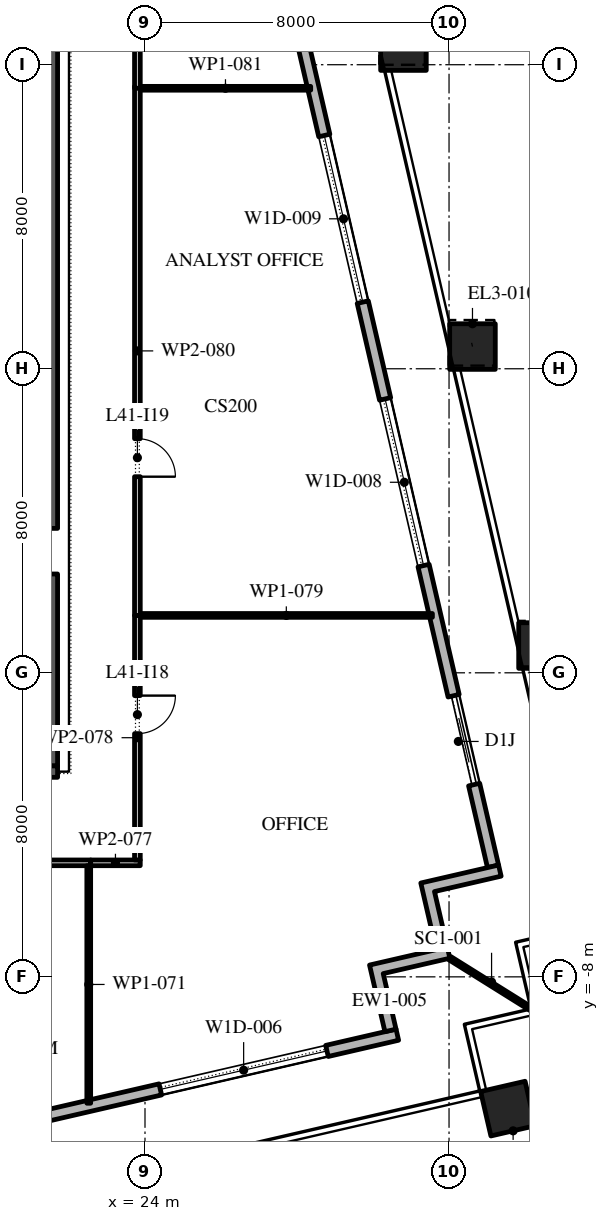
"""IFC4 building model, lengths in metres.
Left out: names, types, materials, properties, quantities, classifications, styles, units other than length and angle.
Written with IfcOpenShell. Run it as: python <this file> out.ifc"""

import sys

from ifc_helpers import new_model, si_unit, direction, frame, frame_2d, origin, origin_2d, place, context, subcontext, project, spatial, polyline, rectangle, outline, extrude, element, fill, save


model = new_model("IFC4")
c1 = context("Model", 3, precision=1e-05, world=origin(), true_north=direction((0.0, 1.0)))
c2 = subcontext(c1, "Body", "Model", "MODEL_VIEW")
j1 = project(units=[si_unit("LENGTHUNIT", "METRE"), si_unit("PLANEANGLEUNIT", "RADIAN")], contexts=[c1])
p1 = place(None, origin())
s1 = spatial("IfcSite", under=j1, at=p1, CompositionType="ELEMENT")
p2 = place(p1, origin())
s2 = spatial("IfcBuilding", under=s1, at=p2, CompositionType="ELEMENT")
p3 = place(p2, frame((0.0, 0.0, 188.4)))
s3 = spatial("IfcBuildingStorey", under=s2, at=p3, CompositionType="ELEMENT", Elevation=188.4)
p4 = place(p3, frame((33.551, -11.467, 0.0), z_axis=(0.0, 0.0, 1.0), x_axis=(0.974370064785, 0.224951054344, 0.0)))
e1 = element("IfcColumn", 1, at=p4, inside=s3, PredefinedType="COLUMN", context=c2, shape_type="SweptSolid", body=[
    extrude(rectangle(XDim=1.2, YDim=1.2, at=origin_2d()), origin(), (0.0, 0.0, 1.0), 4.2),
])
p5 = place(p3, frame((34.433, 0.718, 0.0), z_axis=(-0.002731726181, 0.011682488562, 0.999928025976), x_axis=(-0.973733900744, -0.227689021567, 0.0)))
e2 = element("IfcColumn", 2, at=p5, inside=s3, PredefinedType="COLUMN", context=c2, shape_type="SweptSolid", body=[
    extrude(rectangle(XDim=1.2, YDim=1.2, at=origin_2d()), origin(), (0.0, 0.0, 1.0), 4.2),
])
p6 = place(p3, frame((32.617, 8.584, 0.0), z_axis=(-0.00540415818, 0.023418018779, 0.999711154019), x_axis=(-0.974391195695, -0.224859506699, 0.0)))
e3 = element("IfcColumn", 3, at=p6, inside=s3, PredefinedType="COLUMN", context=c2, shape_type="SweptSolid", body=[
    extrude(rectangle(XDim=1.2, YDim=1.2, at=origin_2d()), origin(), (0.0, 0.0, 1.0), 4.201),
])
p7 = place(p3, frame((30.801, 16.451, 0.0), z_axis=(-0.008074278456, 0.035085353866, 0.999351701841), x_axis=(-0.974526982896, -0.224270282488, 0.0)))
e4 = element("IfcColumn", 4, at=p7, inside=s3, PredefinedType="COLUMN", context=c2, shape_type="SweptSolid", body=[
    extrude(rectangle(XDim=1.2, YDim=1.2, at=origin_2d()), origin(), (0.0, 0.0, 1.0), 4.203),
])
p8 = place(p3, frame((-17.592, -20.657, 0.0), z_axis=(0.0, 0.0, 1.0), x_axis=(0.974370243697, 0.224950279389, 0.0)))
e5 = element("IfcWall", 5, at=p8, inside=s3, PredefinedType="STANDARD", context=c2, shape_type="SweptSolid", body=[
    extrude(rectangle(XDim=49.5, YDim=0.3, at=frame_2d((24.75, 0.0))), origin(), (0.0, 0.0, 1.0), 4.0),
])
p9 = place(p8, frame((2.8, 0.0, 0.0)))
e6 = element("IfcOpeningElement", 6, at=p9, cuts=e5, PredefinedType="OPENING", context=c2, shape_type="SweptSolid", body=[
    extrude(rectangle(XDim=2.4, YDim=3.5, at=frame_2d((1.2, 1.75))), frame((0.0, 0.16, 0.0), z_axis=(0.0, -1.0, 0.0), x_axis=(1.0, 0.0, 0.0)), (0.0, 0.0, 1.0), 0.32),
])
p10 = place(p8, frame((9.9, 0.0, 0.45)))
e7 = element("IfcOpeningElement", 7, at=p10, cuts=e5, PredefinedType="OPENING", context=c2, shape_type="SweptSolid", body=[
    extrude(rectangle(XDim=4.5, YDim=2.575, at=frame_2d((2.25, 1.288))), frame((0.0, 0.16, 0.0), z_axis=(0.0, -1.0, 0.0), x_axis=(1.0, 0.0, 0.0)), (0.0, 0.0, 1.0), 0.32),
])
p11 = place(p8, frame((18.2, 0.0, 0.45)))
e8 = element("IfcOpeningElement", 8, at=p11, cuts=e5, PredefinedType="OPENING", context=c2, shape_type="SweptSolid", body=[
    extrude(rectangle(XDim=4.5, YDim=3.05, at=frame_2d((2.25, 1.525))), frame((0.0, 0.16, 0.0), z_axis=(0.0, -1.0, 0.0), x_axis=(1.0, 0.0, 0.0)), (0.0, 0.0, 1.0), 0.32),
])
p12 = place(p8, frame((26.5, 0.0, 0.45)))
e9 = element("IfcOpeningElement", 9, at=p12, cuts=e5, PredefinedType="OPENING", context=c2, shape_type="SweptSolid", body=[
    extrude(rectangle(XDim=4.5, YDim=2.75, at=frame_2d((2.25, 1.375))), frame((0.0, 0.16, 0.0), z_axis=(0.0, -1.0, 0.0), x_axis=(1.0, 0.0, 0.0)), (0.0, 0.0, 1.0), 0.32),
])
p13 = place(p8, frame((35.85, 0.0, 0.0)))
e10 = element("IfcOpeningElement", 10, at=p13, cuts=e5, PredefinedType="OPENING", context=c2, shape_type="SweptSolid", body=[
    extrude(rectangle(XDim=2.4, YDim=3.5, at=frame_2d((1.2, 1.75))), frame((0.0, 0.16, 0.0), z_axis=(0.0, -1.0, 0.0), x_axis=(1.0, 0.0, 0.0)), (0.0, 0.0, 1.0), 0.32),
])
p14 = place(p8, frame((43.1, 0.0, 0.45)))
e11 = element("IfcOpeningElement", 11, at=p14, cuts=e5, PredefinedType="OPENING", context=c2, shape_type="SweptSolid", body=[
    extrude(rectangle(XDim=4.5, YDim=2.875, at=frame_2d((2.25, 1.438))), frame((0.0, 0.16, 0.0), z_axis=(0.0, -1.0, 0.0), x_axis=(1.0, 0.0, 0.0)), (0.0, 0.0, 1.0), 0.32),
])
p15 = place(p3, frame((33.157, -5.092, 0.0), z_axis=(0.0, 0.0, 1.0), x_axis=(-0.224950279389, 0.974370243697, 0.0)))
e12 = element("IfcWall", 12, at=p15, inside=s3, PredefinedType="STANDARD", context=c2, shape_type="SweptSolid", body=[
    extrude(rectangle(XDim=49.5, YDim=0.3, at=frame_2d((24.75, 0.0))), origin(), (0.0, 0.0, 1.0), 4.0),
])
p16 = place(p15, frame((2.207, 0.0, 0.0)))
e13 = element("IfcOpeningElement", 13, at=p16, cuts=e12, PredefinedType="OPENING", context=c2, shape_type="SweptSolid", body=[
    extrude(rectangle(XDim=2.4, YDim=3.125, at=frame_2d((1.2, 1.562))), frame((0.0, 0.16, 0.0), z_axis=(0.0, -1.0, 0.0), x_axis=(1.0, 0.0, 0.0)), (0.0, 0.0, 1.0), 0.32),
])
p17 = place(p15, frame((8.121, 0.0, 0.45)))
e14 = element("IfcOpeningElement", 14, at=p17, cuts=e12, PredefinedType="OPENING", context=c2, shape_type="SweptSolid", body=[
    extrude(rectangle(XDim=4.5, YDim=2.875, at=frame_2d((2.25, 1.438))), frame((0.0, 0.16, 0.0), z_axis=(0.0, -1.0, 0.0), x_axis=(1.0, 0.0, 0.0)), (0.0, 0.0, 1.0), 0.32),
])
p18 = place(p15, frame((15.236, 0.0, 0.45)))
e15 = element("IfcOpeningElement", 15, at=p18, cuts=e12, PredefinedType="OPENING", context=c2, shape_type="SweptSolid", body=[
    extrude(rectangle(XDim=4.5, YDim=2.875, at=frame_2d((2.25, 1.438))), frame((0.0, 0.16, 0.0), z_axis=(0.0, -1.0, 0.0), x_axis=(1.0, 0.0, 0.0)), (0.0, 0.0, 1.0), 0.32),
])
p19 = place(p15, frame((22.35, 0.0, 0.45)))
e16 = element("IfcOpeningElement", 16, at=p19, cuts=e12, PredefinedType="OPENING", context=c2, shape_type="SweptSolid", body=[
    extrude(rectangle(XDim=4.5, YDim=3.0, at=frame_2d((2.25, 1.5))), frame((0.0, 0.16, 0.0), z_axis=(0.0, -1.0, 0.0), x_axis=(1.0, 0.0, 0.0)), (0.0, 0.0, 1.0), 0.32),
])
p20 = place(p15, frame((30.514, 0.0, 0.0)))
e17 = element("IfcOpeningElement", 17, at=p20, cuts=e12, PredefinedType="OPENING", context=c2, shape_type="SweptSolid", body=[
    extrude(rectangle(XDim=2.4, YDim=3.45, at=frame_2d((1.2, 1.725))), frame((0.0, 0.16, 0.0), z_axis=(0.0, -1.0, 0.0), x_axis=(1.0, 0.0, 0.0)), (0.0, 0.0, 1.0), 0.32),
])
p21 = place(p15, frame((36.579, 0.0, 0.45)))
e18 = element("IfcOpeningElement", 18, at=p21, cuts=e12, PredefinedType="OPENING", context=c2, shape_type="SweptSolid", body=[
    extrude(rectangle(XDim=4.5, YDim=3.05, at=frame_2d((2.25, 1.525))), frame((0.0, 0.16, 0.0), z_axis=(0.0, -1.0, 0.0), x_axis=(1.0, 0.0, 0.0)), (0.0, 0.0, 1.0), 0.32),
])
p22 = place(p15, frame((43.693, 0.0, 0.45)))
e19 = element("IfcOpeningElement", 19, at=p22, cuts=e12, PredefinedType="OPENING", context=c2, shape_type="SweptSolid", body=[
    extrude(rectangle(XDim=4.5, YDim=3.05, at=frame_2d((2.25, 1.525))), frame((0.0, 0.16, 0.0), z_axis=(0.0, -1.0, 0.0), x_axis=(1.0, 0.0, 0.0)), (0.0, 0.0, 1.0), 0.32),
])
p23 = place(p3, origin())
e20 = element("IfcWall", 20, at=p23, inside=s3, PredefinedType="STANDARD", context=c2, shape_type="SweptSolid", body=[
    extrude(outline(polyline([(31.662, -7.285), (31.257, -5.531), (33.303, -5.058), (33.371, -5.351), (31.617, -5.756), (32.022, -7.51), (30.268, -7.914), (30.605, -9.376), (30.313, -9.443), (29.908, -7.69), (31.662, -7.285)])), origin(), (0.0, 0.0, 1.0), 4.0),
])
p24 = place(p3, frame((32.022, -7.51, -0.05), z_axis=(0.0, 0.0, 1.0), x_axis=(0.848047176257, -0.529920736377, 0.0)))
e21 = element("IfcWall", 21, at=p24, inside=s3, PredefinedType="STANDARD", context=c2, shape_type="SweptSolid", body=[
    extrude(rectangle(XDim=2.526, YDim=0.1, at=frame_2d((1.263, 0.0))), origin(), (0.0, 0.0, 1.0), 4.05),
])
p25 = place(p3, frame((21.35, -2.45, 0.0), z_axis=(0.0, 0.0, 1.0), x_axis=(0.0, 1.0, 0.0)))
e22 = element("IfcWall", 22, at=p25, inside=s3, PredefinedType="SHEAR", context=c2, shape_type="SweptSolid", body=[
    extrude(rectangle(XDim=27.9, YDim=0.7, at=frame_2d((13.95, 0.0))), origin(), (0.0, 0.0, 1.0), 4.0),
])
p26 = place(p25, frame((5.05, 0.0, 0.0)))
e23 = element("IfcOpeningElement", 23, at=p26, cuts=e22, PredefinedType="OPENING", context=c2, shape_type="SweptSolid", body=[
    extrude(rectangle(XDim=1.2, YDim=2.1, at=frame_2d((0.6, 1.05))), frame((0.0, 0.36, 0.0), z_axis=(0.0, -1.0, 0.0), x_axis=(1.0, 0.0, 0.0)), (0.0, 0.0, 1.0), 0.72),
])
p27 = place(p25, frame((21.65, 0.0, 0.0)))
e24 = element("IfcOpeningElement", 24, at=p27, cuts=e22, PredefinedType="OPENING", context=c2, shape_type="SweptSolid", body=[
    extrude(rectangle(XDim=1.2, YDim=2.1, at=frame_2d((0.6, 1.05))), frame((0.0, 0.36, 0.0), z_axis=(0.0, -1.0, 0.0), x_axis=(1.0, 0.0, 0.0)), (0.0, 0.0, 1.0), 0.72),
])
p28 = place(p3, frame((10.3, -2.6, 0.0), z_axis=(0.0, 0.0, 1.0), x_axis=(1.0, 0.0, 0.0)))
e25 = element("IfcWall", 25, at=p28, inside=s3, PredefinedType="SHEAR", context=c2, shape_type="SweptSolid", body=[
    extrude(rectangle(XDim=11.4, YDim=0.3, at=frame_2d((5.7, 0.0))), origin(), (0.0, 0.0, 1.0), 4.0),
])
p29 = place(p3, frame((22.57, -5.0, 0.0), z_axis=(0.0, 0.0, 1.0), x_axis=(-1.0, 0.0, 0.0)))
e26 = element("IfcWall", 26, at=p29, inside=s3, PredefinedType="PARTITIONING", context=c2, shape_type="SweptSolid", body=[
    extrude(rectangle(XDim=8.14, YDim=0.15, at=frame_2d((4.07, 0.0))), origin(), (0.0, 0.0, 1.0), 4.0),
])
p30 = place(p29, frame((3.49, 0.0, 0.0)))
e27 = element("IfcOpeningElement", 27, at=p30, cuts=e26, PredefinedType="OPENING", context=c2, shape_type="SweptSolid", body=[
    extrude(rectangle(XDim=1.0, YDim=2.1, at=frame_2d((0.5, 1.05))), frame((0.0, 0.085, 0.0), z_axis=(0.0, -1.0, 0.0), x_axis=(1.0, 0.0, 0.0)), (0.0, 0.0, 1.0), 0.17),
])
p31 = place(p3, frame((22.52, -5.075, 0.0), z_axis=(0.0, 0.0, 1.0), x_axis=(0.0, -1.0, 0.0)))
e28 = element("IfcWall", 28, at=p31, inside=s3, PredefinedType="PARTITIONING", context=c2, shape_type="SweptSolid", body=[
    extrude(rectangle(XDim=6.25, YDim=0.1, at=frame_2d((3.125, 0.0))), origin(), (0.0, 0.0, 1.0), 4.0),
])
p32 = place(p3, frame((23.875, -5.0, 0.0), z_axis=(0.0, 0.0, 1.0), x_axis=(-1.0, 0.0, 0.0)))
e29 = element("IfcWall", 29, at=p32, inside=s3, PredefinedType="PARTITIONING", context=c2, shape_type="SweptSolid", body=[
    extrude(rectangle(XDim=1.305, YDim=0.15, at=frame_2d((0.652, 0.0))), origin(), (0.0, 0.0, 1.0), 4.0),
])
p33 = place(p3, frame((23.8, 1.51, 0.0), z_axis=(0.0, 0.0, 1.0), x_axis=(0.0, -1.0, 0.0)))
e30 = element("IfcWall", 30, at=p33, inside=s3, PredefinedType="PARTITIONING", context=c2, shape_type="SweptSolid", body=[
    extrude(rectangle(XDim=6.435, YDim=0.15, at=frame_2d((3.218, 0.0))), origin(), (0.0, 0.0, 1.0), 4.0),
])
p34 = place(p33, frame((2.11, 0.0, 0.0)))
e31 = element("IfcOpeningElement", 31, at=p34, cuts=e30, PredefinedType="OPENING", context=c2, shape_type="SweptSolid", body=[
    extrude(rectangle(XDim=1.0, YDim=2.1, at=frame_2d((0.5, 1.05))), frame((0.0, 0.085, 0.0), z_axis=(0.0, -1.0, 0.0), x_axis=(1.0, 0.0, 0.0)), (0.0, 0.0, 1.0), 0.17),
])
p35 = place(p3, frame((23.875, 1.51, 0.0), z_axis=(0.0, 0.0, 1.0), x_axis=(1.0, 0.0, 0.0)))
e32 = element("IfcWall", 32, at=p35, inside=s3, PredefinedType="PARTITIONING", context=c2, shape_type="SweptSolid", body=[
    extrude(rectangle(XDim=7.687, YDim=0.1, at=frame_2d((3.844, 0.0))), origin(), (0.0, 0.0, 1.0), 4.0),
])
p36 = place(p3, frame((23.8, 15.43, 0.0), z_axis=(0.0, 0.0, 1.0), x_axis=(0.0, -1.0, 0.0)))
e33 = element("IfcWall", 33, at=p36, inside=s3, PredefinedType="PARTITIONING", context=c2, shape_type="SweptSolid", body=[
    extrude(rectangle(XDim=13.92, YDim=0.15, at=frame_2d((6.96, 0.0))), origin(), (0.0, 0.0, 1.0), 4.0),
])
p37 = place(p36, frame((9.27, 0.0, 0.0)))
e34 = element("IfcOpeningElement", 34, at=p37, cuts=e33, PredefinedType="OPENING", context=c2, shape_type="SweptSolid", body=[
    extrude(rectangle(XDim=1.0, YDim=2.1, at=frame_2d((0.5, 1.05))), frame((0.0, 0.085, 0.0), z_axis=(0.0, -1.0, 0.0), x_axis=(1.0, 0.0, 0.0)), (0.0, 0.0, 1.0), 0.17),
])
p38 = place(p3, frame((23.875, 15.38, 0.0), z_axis=(0.0, 0.0, 1.0), x_axis=(1.0, 0.0, 0.0)))
e35 = element("IfcWall", 35, at=p38, inside=s3, PredefinedType="PARTITIONING", context=c2, shape_type="SweptSolid", body=[
    extrude(rectangle(XDim=4.485, YDim=0.1, at=frame_2d((2.243, 0.0))), origin(), (0.0, 0.0, 1.0), 4.0),
])
p39 = place(p3, frame((23.8, 23.54, 0.0), z_axis=(0.0, 0.0, 1.0), x_axis=(0.0, -1.0, 0.0)))
e36 = element("IfcWall", 36, at=p39, inside=s3, PredefinedType="PARTITIONING", context=c2, shape_type="SweptSolid", body=[
    extrude(rectangle(XDim=8.16, YDim=0.15, at=frame_2d((4.08, 0.0))), origin(), (0.0, 0.0, 1.0), 4.0),
])
p40 = place(p39, frame((3.51, 0.0, 0.0)))
e37 = element("IfcOpeningElement", 37, at=p40, cuts=e36, PredefinedType="OPENING", context=c2, shape_type="SweptSolid", body=[
    extrude(rectangle(XDim=1.0, YDim=2.1, at=frame_2d((0.5, 1.05))), frame((0.0, 0.085, 0.0), z_axis=(0.0, -1.0, 0.0), x_axis=(1.0, 0.0, 0.0)), (0.0, 0.0, 1.0), 0.17),
])
p41 = place(p14, origin())
e38 = element("IfcWindow", 38, at=p41, inside=s3, PartitioningType="DOUBLE_PANEL_VERTICAL", PredefinedType="WINDOW", context=c2, shape_type="SweptSolid", body=[
    extrude(rectangle(XDim=4.5, YDim=2.875, at=frame_2d((2.25, 1.438))), frame((0.0, 0.03, 0.0), z_axis=(0.0, -1.0, 0.0), x_axis=(1.0, 0.0, 0.0)), (0.0, 0.0, 1.0), 0.06),
])
fill(e11, e38)
p42 = place(p16, origin())
e39 = element("IfcDoor", 39, at=p42, inside=s3, OperationType="DOUBLE_DOOR_SLIDING", PredefinedType="DOOR", context=c2, shape_type="SweptSolid", body=[
    extrude(rectangle(XDim=2.4, YDim=3.125, at=frame_2d((1.2, 1.562))), frame((0.0, 0.025, 0.0), z_axis=(0.0, -1.0, 0.0), x_axis=(1.0, 0.0, 0.0)), (0.0, 0.0, 1.0), 0.05),
])
fill(e13, e39)
p43 = place(p17, origin())
e40 = element("IfcWindow", 40, at=p43, inside=s3, PartitioningType="DOUBLE_PANEL_VERTICAL", PredefinedType="WINDOW", context=c2, shape_type="SweptSolid", body=[
    extrude(rectangle(XDim=4.5, YDim=2.875, at=frame_2d((2.25, 1.438))), frame((0.0, 0.03, 0.0), z_axis=(0.0, -1.0, 0.0), x_axis=(1.0, 0.0, 0.0)), (0.0, 0.0, 1.0), 0.06),
])
fill(e14, e40)
p44 = place(p18, origin())
e41 = element("IfcWindow", 41, at=p44, inside=s3, PartitioningType="DOUBLE_PANEL_VERTICAL", PredefinedType="WINDOW", context=c2, shape_type="SweptSolid", body=[
    extrude(rectangle(XDim=4.5, YDim=2.875, at=frame_2d((2.25, 1.438))), frame((0.0, 0.03, 0.0), z_axis=(0.0, -1.0, 0.0), x_axis=(1.0, 0.0, 0.0)), (0.0, 0.0, 1.0), 0.06),
])
fill(e15, e41)
p45 = place(p34, origin())
e42 = element("IfcDoor", 42, at=p45, inside=s3, OperationType="SINGLE_SWING_RIGHT", PredefinedType="DOOR", context=c2, shape_type="SweptSolid", body=[
    extrude(rectangle(XDim=1.0, YDim=2.1, at=frame_2d((0.5, 1.05))), frame((0.0, 0.025, 0.0), z_axis=(0.0, -1.0, 0.0), x_axis=(1.0, 0.0, 0.0)), (0.0, 0.0, 1.0), 0.05),
])
fill(e31, e42)
p46 = place(p37, origin())
e43 = element("IfcDoor", 43, at=p46, inside=s3, OperationType="SINGLE_SWING_LEFT", PredefinedType="DOOR", context=c2, shape_type="SweptSolid", body=[
    extrude(rectangle(XDim=1.0, YDim=2.1, at=frame_2d((0.5, 1.05))), frame((0.0, 0.025, 0.0), z_axis=(0.0, -1.0, 0.0), x_axis=(1.0, 0.0, 0.0)), (0.0, 0.0, 1.0), 0.05),
])
fill(e34, e43)
save(model, sys.argv[1])
